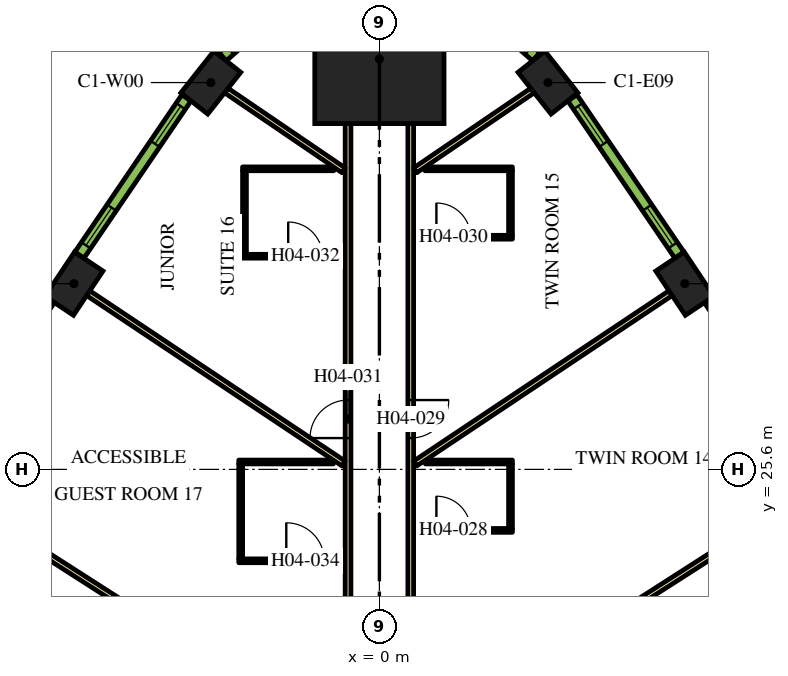
"""IFC4 building model, lengths in metres.
Left out: names, types, materials, properties, quantities, classifications, styles, units other than length and angle.
Written with IfcOpenShell. Run it as: python <this file> out.ifc"""

import sys

from ifc_helpers import new_model, si_unit, direction, frame, frame_2d, origin, origin_2d, place, context, subcontext, project, spatial, rectangle, extrude, element, fill, save


model = new_model("IFC4")
c1 = context("Model", 3, precision=1e-05, world=origin(), true_north=direction((0.0, 1.0)))
c2 = subcontext(c1, "Body", "Model", "MODEL_VIEW")
j1 = project(units=[si_unit("LENGTHUNIT", "METRE"), si_unit("PLANEANGLEUNIT", "RADIAN")], contexts=[c1])
p1 = place(None, origin())
s1 = spatial("IfcSite", under=j1, at=p1, CompositionType="ELEMENT")
p2 = place(p1, origin())
s2 = spatial("IfcBuilding", under=s1, at=p2, CompositionType="ELEMENT")
p3 = place(p2, frame((0.0, 0.0, 66.6)))
s3 = spatial("IfcBuildingStorey", under=s2, at=p3, CompositionType="ELEMENT", Elevation=66.6)
p4 = place(p3, frame((0.0, 36.399, 0.0), z_axis=(0.0, 0.0, 1.0), x_axis=(0.0, 1.0, 0.0)))
e1 = element("IfcColumn", 1, at=p4, inside=s3, PredefinedType="COLUMN", context=c2, shape_type="SweptSolid", body=[
    extrude(rectangle(XDim=3.4, YDim=3.4, at=origin_2d()), origin(), (0.0, 0.0, 1.0), 3.9),
])
for number, where, z_axis, x_axis in (
    (2, (8.037, 30.487, 0.0), (0.0, 0.0, 1.0), (-0.555, 0.832, 0.0)),
    (3, (4.436, 35.778, 0.0), (0.0, 0.0, 1.0), (-0.62, 0.784, 0.0)),
    (4, (-4.436, 35.778, 0.0), (0.0, 0.0, 1.0), (-0.62, -0.784, 0.0)),
    (5, (-8.037, 30.487, 0.0), (0.0, 0.0, 1.0), (-0.555, -0.832, 0.0)),
):
    element("IfcColumn", number, at=place(p3, frame(where, z_axis=z_axis, x_axis=x_axis)), inside=s3, PredefinedType="COLUMN", context=c2, shape_type="SweptSolid", body=[
        extrude(rectangle(XDim=1.4, YDim=0.9, at=origin_2d()), origin(), (0.0, 0.0, 1.0), 3.9),
    ])
p5 = place(p3, frame((0.825, 34.699, 0.0), z_axis=(0.0, 0.0, 1.0), x_axis=(0.0, -1.0, 0.0)))
e6 = element("IfcWall", 6, at=p5, inside=s3, PredefinedType="PARTITIONING", context=c2, shape_type="SweptSolid", body=[
    extrude(rectangle(XDim=16.144, YDim=0.15, at=frame_2d((8.072, 0.0))), origin(), (0.0, 0.0, 1.0), 2.75),
])
p6 = place(p5, frame((14.714, 0.0, 0.0)))
e7 = element("IfcOpeningElement", 7, at=p6, cuts=e6, PredefinedType="OPENING", context=c2, shape_type="SweptSolid", body=[
    extrude(rectangle(XDim=1.0, YDim=2.1, at=frame_2d((0.5, 1.05))), frame((0.0, 0.085, 0.0), z_axis=(0.0, -1.0, 0.0), x_axis=(1.0, 0.0, 0.0)), (0.0, 0.0, 1.0), 0.17),
])
p7 = place(p5, frame((7.275, 0.0, 0.0)))
e8 = element("IfcOpeningElement", 8, at=p7, cuts=e6, PredefinedType="OPENING", context=c2, shape_type="SweptSolid", body=[
    extrude(rectangle(XDim=1.0, YDim=2.1, at=frame_2d((0.5, 1.05))), frame((0.0, 0.085, 0.0), z_axis=(0.0, -1.0, 0.0), x_axis=(1.0, 0.0, 0.0)), (0.0, 0.0, 1.0), 0.17),
])
p8 = place(p3, frame((-0.825, 18.475, 0.0), z_axis=(0.0, 0.0, 1.0), x_axis=(0.0, 1.0, 0.0)))
e9 = element("IfcWall", 9, at=p8, inside=s3, PredefinedType="PARTITIONING", context=c2, shape_type="SweptSolid", body=[
    extrude(rectangle(XDim=16.224, YDim=0.15, at=frame_2d((8.112, 0.0))), origin(), (0.0, 0.0, 1.0), 2.75),
])
p9 = place(p8, frame((7.949, 0.0, 0.0)))
e10 = element("IfcOpeningElement", 10, at=p9, cuts=e9, PredefinedType="OPENING", context=c2, shape_type="SweptSolid", body=[
    extrude(rectangle(XDim=1.0, YDim=2.1, at=frame_2d((0.5, 1.05))), frame((0.0, 0.085, 0.0), z_axis=(0.0, -1.0, 0.0), x_axis=(1.0, 0.0, 0.0)), (0.0, 0.0, 1.0), 0.17),
])
p10 = place(p8, frame((0.526, 0.0, 0.0)))
e11 = element("IfcOpeningElement", 11, at=p10, cuts=e9, PredefinedType="OPENING", context=c2, shape_type="SweptSolid", body=[
    extrude(rectangle(XDim=1.1, YDim=2.1, at=frame_2d((0.55, 1.05))), frame((0.0, 0.085, 0.0), z_axis=(0.0, -1.0, 0.0), x_axis=(1.0, 0.0, 0.0)), (0.0, 0.0, 1.0), 0.17),
])
p11 = place(p3, frame((-11.16, 24.888, 0.0), z_axis=(0.0, 0.0, 1.0), x_axis=(0.84199813156, -0.539480441211, 0.0)))
e12 = element("IfcWall", 12, at=p11, inside=s3, PredefinedType="PARTITIONING", context=c2, shape_type="SweptSolid", body=[
    extrude(rectangle(XDim=11.638, YDim=0.15, at=frame_2d((5.819, 0.0))), origin(), (0.0, 0.0, 1.0), 2.75),
])
p12 = place(p3, frame((-7.662, 30.238, 0.0), z_axis=(0.0, 0.0, 1.0), x_axis=(0.831882886825, -0.554951225431, 0.0)))
e13 = element("IfcWall", 13, at=p12, inside=s3, PredefinedType="PARTITIONING", context=c2, shape_type="SweptSolid", body=[
    extrude(rectangle(XDim=8.079, YDim=0.15, at=frame_2d((4.04, 0.0))), origin(), (0.0, 0.0, 1.0), 2.75),
])
p13 = place(p3, frame((-4.028, 35.569, 0.0), z_axis=(0.0, 0.0, 1.0), x_axis=(0.826730622998, -0.562597971021, 0.0)))
e14 = element("IfcWall", 14, at=p13, inside=s3, PredefinedType="PARTITIONING", context=c2, shape_type="SweptSolid", body=[
    extrude(rectangle(XDim=3.733, YDim=0.15, at=frame_2d((1.867, 0.0))), origin(), (0.0, 0.0, 1.0), 2.75),
])
p14 = place(p3, frame((7.662, 30.238, 0.0), z_axis=(0.0, 0.0, 1.0), x_axis=(-0.831882886825, -0.554951225431, 0.0)))
e15 = element("IfcWall", 15, at=p14, inside=s3, PredefinedType="PARTITIONING", context=c2, shape_type="SweptSolid", body=[
    extrude(rectangle(XDim=8.079, YDim=0.15, at=frame_2d((4.04, 0.0))), origin(), (0.0, 0.0, 1.0), 2.75),
])
p15 = place(p3, frame((11.16, 24.888, 0.0), z_axis=(0.0, 0.0, 1.0), x_axis=(-0.84199813156, -0.539480441211, 0.0)))
e16 = element("IfcWall", 16, at=p15, inside=s3, PredefinedType="PARTITIONING", context=c2, shape_type="SweptSolid", body=[
    extrude(rectangle(XDim=11.638, YDim=0.15, at=frame_2d((5.819, 0.0))), origin(), (0.0, 0.0, 1.0), 2.75),
])
p16 = place(p3, frame((4.028, 35.569, 0.0), z_axis=(0.0, 0.0, 1.0), x_axis=(-0.826730622998, -0.562597971021, 0.0)))
e17 = element("IfcWall", 17, at=p16, inside=s3, PredefinedType="PARTITIONING", context=c2, shape_type="SweptSolid", body=[
    extrude(rectangle(XDim=3.733, YDim=0.15, at=frame_2d((1.867, 0.0))), origin(), (0.0, 0.0, 1.0), 2.75),
])
p17 = place(p3, frame((0.9, 23.994, 0.0), z_axis=(0.0, 0.0, 1.0), x_axis=(1.0, 0.0, 0.0)))
e18 = element("IfcWall", 18, at=p17, inside=s3, PredefinedType="PARTITIONING", context=c2, shape_type="SweptSolid", body=[
    extrude(rectangle(XDim=2.6, YDim=0.1, at=frame_2d((1.3, 0.0))), origin(), (0.0, 0.0, 1.0), 2.75),
])
p18 = place(p17, frame((0.6, 0.0, 0.0)))
e19 = element("IfcOpeningElement", 19, at=p18, cuts=e18, PredefinedType="OPENING", context=c2, shape_type="SweptSolid", body=[
    extrude(rectangle(XDim=0.9, YDim=2.1, at=frame_2d((0.45, 1.05))), frame((0.0, 0.06, 0.0), z_axis=(0.0, -1.0, 0.0), x_axis=(1.0, 0.0, 0.0)), (0.0, 0.0, 1.0), 0.12),
])
p19 = place(p3, frame((3.45, 24.044, 0.0), z_axis=(0.0, 0.0, 1.0), x_axis=(0.0, 1.0, 0.0)))
e20 = element("IfcWall", 20, at=p19, inside=s3, PredefinedType="PARTITIONING", context=c2, shape_type="SweptSolid", body=[
    extrude(rectangle(XDim=1.7, YDim=0.1, at=frame_2d((0.85, 0.0))), origin(), (0.0, 0.0, 1.0), 2.75),
])
p20 = place(p3, frame((1.21, 25.794, 0.0), z_axis=(0.0, 0.0, 1.0), x_axis=(1.0, 0.0, 0.0)))
e21 = element("IfcWall", 21, at=p20, inside=s3, PredefinedType="PARTITIONING", context=c2, shape_type="SweptSolid", body=[
    extrude(rectangle(XDim=2.29, YDim=0.1, at=frame_2d((1.145, 0.0))), origin(), (0.0, 0.0, 1.0), 2.75),
])
p21 = place(p3, frame((0.9, 31.708, 0.0), z_axis=(0.0, 0.0, 1.0), x_axis=(1.0, 0.0, 0.0)))
e22 = element("IfcWall", 22, at=p21, inside=s3, PredefinedType="PARTITIONING", context=c2, shape_type="SweptSolid", body=[
    extrude(rectangle(XDim=2.6, YDim=0.1, at=frame_2d((1.3, 0.0))), origin(), (0.0, 0.0, 1.0), 2.75),
])
p22 = place(p21, frame((0.6, 0.0, 0.0)))
e23 = element("IfcOpeningElement", 23, at=p22, cuts=e22, PredefinedType="OPENING", context=c2, shape_type="SweptSolid", body=[
    extrude(rectangle(XDim=0.9, YDim=2.1, at=frame_2d((0.45, 1.05))), frame((0.0, 0.06, 0.0), z_axis=(0.0, -1.0, 0.0), x_axis=(1.0, 0.0, 0.0)), (0.0, 0.0, 1.0), 0.12),
])
p23 = place(p3, frame((3.45, 31.759, 0.0), z_axis=(0.0, 0.0, 1.0), x_axis=(0.0, 1.0, 0.0)))
e24 = element("IfcWall", 24, at=p23, inside=s3, PredefinedType="PARTITIONING", context=c2, shape_type="SweptSolid", body=[
    extrude(rectangle(XDim=1.7, YDim=0.1, at=frame_2d((0.85, 0.0))), origin(), (0.0, 0.0, 1.0), 2.75),
])
p24 = place(p3, frame((1.2, 33.509, 0.0), z_axis=(0.0, 0.0, 1.0), x_axis=(1.0, 0.0, 0.0)))
e25 = element("IfcWall", 25, at=p24, inside=s3, PredefinedType="PARTITIONING", context=c2, shape_type="SweptSolid", body=[
    extrude(rectangle(XDim=2.3, YDim=0.1, at=frame_2d((1.15, 0.0))), origin(), (0.0, 0.0, 1.0), 2.75),
])
p25 = place(p3, frame((-3.6, 31.208, 0.0), z_axis=(0.0, 0.0, 1.0), x_axis=(1.0, 0.0, 0.0)))
e26 = element("IfcWall", 26, at=p25, inside=s3, PredefinedType="PARTITIONING", context=c2, shape_type="SweptSolid", body=[
    extrude(rectangle(XDim=2.7, YDim=0.1, at=frame_2d((1.35, 0.0))), origin(), (0.0, 0.0, 1.0), 2.75),
])
p26 = place(p25, frame((1.2, 0.0, 0.0)))
e27 = element("IfcOpeningElement", 27, at=p26, cuts=e26, PredefinedType="OPENING", context=c2, shape_type="SweptSolid", body=[
    extrude(rectangle(XDim=0.9, YDim=2.1, at=frame_2d((0.45, 1.05))), frame((0.0, 0.06, 0.0), z_axis=(0.0, -1.0, 0.0), x_axis=(1.0, 0.0, 0.0)), (0.0, 0.0, 1.0), 0.12),
])
p27 = place(p3, frame((-3.55, 31.259, 0.0), z_axis=(0.0, 0.0, 1.0), x_axis=(0.0, 1.0, 0.0)))
e28 = element("IfcWall", 28, at=p27, inside=s3, PredefinedType="PARTITIONING", context=c2, shape_type="SweptSolid", body=[
    extrude(rectangle(XDim=2.2, YDim=0.1, at=frame_2d((1.1, 0.0))), origin(), (0.0, 0.0, 1.0), 2.75),
])
p28 = place(p3, frame((-1.2, 33.509, 0.0), z_axis=(0.0, 0.0, 1.0), x_axis=(-1.0, 0.0, 0.0)))
e29 = element("IfcWall", 29, at=p28, inside=s3, PredefinedType="PARTITIONING", context=c2, shape_type="SweptSolid", body=[
    extrude(rectangle(XDim=2.4, YDim=0.1, at=frame_2d((1.2, 0.0))), origin(), (0.0, 0.0, 1.0), 2.75),
])
p29 = place(p3, frame((-3.7, 23.195, 0.0), z_axis=(0.0, 0.0, 1.0), x_axis=(1.0, 0.0, 0.0)))
e30 = element("IfcWall", 30, at=p29, inside=s3, PredefinedType="PARTITIONING", context=c2, shape_type="SweptSolid", body=[
    extrude(rectangle(XDim=2.8, YDim=0.1, at=frame_2d((1.4, 0.0))), origin(), (0.0, 0.0, 1.0), 2.75),
])
p30 = place(p29, frame((1.25, 0.0, 0.0)))
e31 = element("IfcOpeningElement", 31, at=p30, cuts=e30, PredefinedType="OPENING", context=c2, shape_type="SweptSolid", body=[
    extrude(rectangle(XDim=1.0, YDim=2.1, at=frame_2d((0.5, 1.05))), frame((0.0, 0.06, 0.0), z_axis=(0.0, -1.0, 0.0), x_axis=(1.0, 0.0, 0.0)), (0.0, 0.0, 1.0), 0.12),
])
p31 = place(p3, frame((-3.65, 23.245, 0.0), z_axis=(0.0, 0.0, 1.0), x_axis=(0.0, 1.0, 0.0)))
e32 = element("IfcWall", 32, at=p31, inside=s3, PredefinedType="PARTITIONING", context=c2, shape_type="SweptSolid", body=[
    extrude(rectangle(XDim=2.5, YDim=0.1, at=frame_2d((1.25, 0.0))), origin(), (0.0, 0.0, 1.0), 2.75),
])
p32 = place(p3, frame((-1.21, 25.795, 0.0), z_axis=(0.0, 0.0, 1.0), x_axis=(-1.0, 0.0, 0.0)))
e33 = element("IfcWall", 33, at=p32, inside=s3, PredefinedType="PARTITIONING", context=c2, shape_type="SweptSolid", body=[
    extrude(rectangle(XDim=2.49, YDim=0.1, at=frame_2d((1.245, 0.0))), origin(), (0.0, 0.0, 1.0), 2.75),
])
p33 = place(p3, frame((11.411, 25.884, 0.0), z_axis=(0.0, 0.0, 1.0), x_axis=(-0.547204617628, 0.836998868845, 0.0)))
e34 = element("IfcWall", 34, at=p33, inside=s3, PredefinedType="SOLIDWALL", context=c2, shape_type="SweptSolid", body=[
    extrude(rectangle(XDim=4.998, YDim=0.29, at=frame_2d((2.499, 0.0))), origin(), (0.0, 0.0, 1.0), 3.65),
])
p34 = place(p33, frame((0.297, 0.0, 0.9)))
e35 = element("IfcOpeningElement", 35, at=p34, cuts=e34, PredefinedType="OPENING", context=c2, shape_type="SweptSolid", body=[
    extrude(rectangle(XDim=1.2, YDim=2.15, at=frame_2d((0.6, 1.075))), frame((0.0, 0.155, 0.0), z_axis=(0.0, -1.0, 0.0), x_axis=(1.0, 0.0, 0.0)), (0.0, 0.0, 1.0), 0.31),
])
p35 = place(p33, frame((3.501, 0.0, 0.9)))
e36 = element("IfcOpeningElement", 36, at=p35, cuts=e34, PredefinedType="OPENING", context=c2, shape_type="SweptSolid", body=[
    extrude(rectangle(XDim=1.2, YDim=2.15, at=frame_2d((0.6, 1.075))), frame((0.0, 0.155, 0.0), z_axis=(0.0, -1.0, 0.0), x_axis=(1.0, 0.0, 0.0)), (0.0, 0.0, 1.0), 0.31),
])
p36 = place(p3, frame((7.895, 31.238, 0.0), z_axis=(0.0, 0.0, 1.0), x_axis=(-0.562610153679, 0.826722332454, 0.0)))
e37 = element("IfcWall", 37, at=p36, inside=s3, PredefinedType="SOLIDWALL", context=c2, shape_type="SweptSolid", body=[
    extrude(rectangle(XDim=5.006, YDim=0.29, at=frame_2d((2.503, 0.0))), origin(), (0.0, 0.0, 1.0), 3.65),
])
p37 = place(p36, frame((0.31, 0.0, 0.9)))
e38 = element("IfcOpeningElement", 38, at=p37, cuts=e37, PredefinedType="OPENING", context=c2, shape_type="SweptSolid", body=[
    extrude(rectangle(XDim=1.2, YDim=2.15, at=frame_2d((0.6, 1.075))), frame((0.0, 0.155, 0.0), z_axis=(0.0, -1.0, 0.0), x_axis=(1.0, 0.0, 0.0)), (0.0, 0.0, 1.0), 0.31),
])
p38 = place(p36, frame((3.541, 0.0, 0.9)))
e39 = element("IfcOpeningElement", 39, at=p38, cuts=e37, PredefinedType="OPENING", context=c2, shape_type="SweptSolid", body=[
    extrude(rectangle(XDim=1.2, YDim=2.15, at=frame_2d((0.6, 1.075))), frame((0.0, 0.155, 0.0), z_axis=(0.0, -1.0, 0.0), x_axis=(1.0, 0.0, 0.0)), (0.0, 0.0, 1.0), 0.31),
])
p39 = place(p3, frame((4.125, 36.459, 0.0), z_axis=(0.0, 0.0, 1.0), x_axis=(-0.749812680302, 0.661650167731, 0.0)))
e40 = element("IfcWall", 40, at=p39, inside=s3, PredefinedType="SOLIDWALL", context=c2, shape_type="SweptSolid", body=[
    extrude(rectangle(XDim=1.415, YDim=0.29, at=frame_2d((0.708, 0.0))), origin(), (0.0, 0.0, 1.0), 3.65),
])
p40 = place(p39, frame((0.258, 0.0, 0.9)))
e41 = element("IfcOpeningElement", 41, at=p40, cuts=e40, PredefinedType="OPENING", context=c2, shape_type="SweptSolid", body=[
    extrude(rectangle(XDim=0.9, YDim=2.15, at=frame_2d((0.45, 1.075))), frame((0.0, 0.155, 0.0), z_axis=(0.0, -1.0, 0.0), x_axis=(1.0, 0.0, 0.0)), (0.0, 0.0, 1.0), 0.31),
])
p41 = place(p3, frame((-3.064, 37.395, 0.0), z_axis=(0.0, 0.0, 1.0), x_axis=(-0.749812680302, -0.661650167731, 0.0)))
e42 = element("IfcWall", 42, at=p41, inside=s3, PredefinedType="SOLIDWALL", context=c2, shape_type="SweptSolid", body=[
    extrude(rectangle(XDim=1.415, YDim=0.29, at=frame_2d((0.708, 0.0))), origin(), (0.0, 0.0, 1.0), 3.65),
])
p42 = place(p41, frame((0.258, 0.0, 0.9)))
e43 = element("IfcOpeningElement", 43, at=p42, cuts=e42, PredefinedType="OPENING", context=c2, shape_type="SweptSolid", body=[
    extrude(rectangle(XDim=0.9, YDim=2.15, at=frame_2d((0.45, 1.075))), frame((0.0, 0.155, 0.0), z_axis=(0.0, -1.0, 0.0), x_axis=(1.0, 0.0, 0.0)), (0.0, 0.0, 1.0), 0.31),
])
p43 = place(p3, frame((-5.078, 35.376, 0.0), z_axis=(0.0, 0.0, 1.0), x_axis=(-0.562610153679, -0.826722332454, 0.0)))
e44 = element("IfcWall", 44, at=p43, inside=s3, PredefinedType="SOLIDWALL", context=c2, shape_type="SweptSolid", body=[
    extrude(rectangle(XDim=5.006, YDim=0.29, at=frame_2d((2.503, 0.0))), origin(), (0.0, 0.0, 1.0), 3.65),
])
p44 = place(p43, frame((0.265, 0.0, 0.9)))
e45 = element("IfcOpeningElement", 45, at=p44, cuts=e44, PredefinedType="OPENING", context=c2, shape_type="SweptSolid", body=[
    extrude(rectangle(XDim=1.2, YDim=2.15, at=frame_2d((0.6, 1.075))), frame((0.0, 0.155, 0.0), z_axis=(0.0, -1.0, 0.0), x_axis=(1.0, 0.0, 0.0)), (0.0, 0.0, 1.0), 0.31),
])
p45 = place(p43, frame((3.495, 0.0, 0.9)))
e46 = element("IfcOpeningElement", 46, at=p45, cuts=e44, PredefinedType="OPENING", context=c2, shape_type="SweptSolid", body=[
    extrude(rectangle(XDim=1.2, YDim=2.15, at=frame_2d((0.6, 1.075))), frame((0.0, 0.155, 0.0), z_axis=(0.0, -1.0, 0.0), x_axis=(1.0, 0.0, 0.0)), (0.0, 0.0, 1.0), 0.31),
])
p46 = place(p3, frame((-8.676, 30.068, 0.0), z_axis=(0.0, 0.0, 1.0), x_axis=(-0.547204617628, -0.836998868845, 0.0)))
e47 = element("IfcWall", 47, at=p46, inside=s3, PredefinedType="SOLIDWALL", context=c2, shape_type="SweptSolid", body=[
    extrude(rectangle(XDim=4.998, YDim=0.29, at=frame_2d((2.499, 0.0))), origin(), (0.0, 0.0, 1.0), 3.65),
])
p47 = place(p46, frame((0.297, 0.0, 0.9)))
e48 = element("IfcOpeningElement", 48, at=p47, cuts=e47, PredefinedType="OPENING", context=c2, shape_type="SweptSolid", body=[
    extrude(rectangle(XDim=1.2, YDim=2.15, at=frame_2d((0.6, 1.075))), frame((0.0, 0.155, 0.0), z_axis=(0.0, -1.0, 0.0), x_axis=(1.0, 0.0, 0.0)), (0.0, 0.0, 1.0), 0.31),
])
p48 = place(p46, frame((3.501, 0.0, 0.9)))
e49 = element("IfcOpeningElement", 49, at=p48, cuts=e47, PredefinedType="OPENING", context=c2, shape_type="SweptSolid", body=[
    extrude(rectangle(XDim=1.2, YDim=2.15, at=frame_2d((0.6, 1.075))), frame((0.0, 0.155, 0.0), z_axis=(0.0, -1.0, 0.0), x_axis=(1.0, 0.0, 0.0)), (0.0, 0.0, 1.0), 0.31),
])
p49 = place(p18, origin())
e50 = element("IfcDoor", 50, at=p49, inside=s3, OperationType="SINGLE_SWING_LEFT", PredefinedType="DOOR", context=c2, shape_type="SweptSolid", body=[
    extrude(rectangle(XDim=0.9, YDim=2.1, at=frame_2d((0.45, 1.05))), frame((0.0, 0.025, 0.0), z_axis=(0.0, -1.0, 0.0), x_axis=(1.0, 0.0, 0.0)), (0.0, 0.0, 1.0), 0.05),
])
fill(e19, e50)
p50 = place(p7, origin())
e51 = element("IfcDoor", 51, at=p50, inside=s3, OperationType="SINGLE_SWING_RIGHT", PredefinedType="DOOR", context=c2, shape_type="SweptSolid", body=[
    extrude(rectangle(XDim=1.0, YDim=2.1, at=frame_2d((0.5, 1.05))), frame((0.0, 0.025, 0.0), z_axis=(0.0, -1.0, 0.0), x_axis=(1.0, 0.0, 0.0)), (0.0, 0.0, 1.0), 0.05),
])
fill(e8, e51)
p51 = place(p22, origin())
e52 = element("IfcDoor", 52, at=p51, inside=s3, OperationType="SINGLE_SWING_RIGHT", PredefinedType="DOOR", context=c2, shape_type="SweptSolid", body=[
    extrude(rectangle(XDim=0.9, YDim=2.1, at=frame_2d((0.45, 1.05))), frame((0.0, 0.025, 0.0), z_axis=(0.0, -1.0, 0.0), x_axis=(1.0, 0.0, 0.0)), (0.0, 0.0, 1.0), 0.05),
])
fill(e23, e52)
p52 = place(p9, origin())
e53 = element("IfcDoor", 53, at=p52, inside=s3, OperationType="SINGLE_SWING_LEFT", PredefinedType="DOOR", context=c2, shape_type="SweptSolid", body=[
    extrude(rectangle(XDim=1.0, YDim=2.1, at=frame_2d((0.5, 1.05))), frame((0.0, 0.025, 0.0), z_axis=(0.0, -1.0, 0.0), x_axis=(1.0, 0.0, 0.0)), (0.0, 0.0, 1.0), 0.05),
])
fill(e10, e53)
p53 = place(p26, origin())
e54 = element("IfcDoor", 54, at=p53, inside=s3, OperationType="SINGLE_SWING_LEFT", PredefinedType="DOOR", context=c2, shape_type="SweptSolid", body=[
    extrude(rectangle(XDim=0.9, YDim=2.1, at=frame_2d((0.45, 1.05))), frame((0.0, 0.025, 0.0), z_axis=(0.0, -1.0, 0.0), x_axis=(1.0, 0.0, 0.0)), (0.0, 0.0, 1.0), 0.05),
])
fill(e27, e54)
p54 = place(p30, origin())
e55 = element("IfcDoor", 55, at=p54, inside=s3, OperationType="SINGLE_SWING_LEFT", PredefinedType="DOOR", context=c2, shape_type="SweptSolid", body=[
    extrude(rectangle(XDim=1.0, YDim=2.1, at=frame_2d((0.5, 1.05))), frame((0.0, 0.025, 0.0), z_axis=(0.0, -1.0, 0.0), x_axis=(1.0, 0.0, 0.0)), (0.0, 0.0, 1.0), 0.05),
])
fill(e31, e55)
p55 = place(p37, origin())
e56 = element("IfcWindow", 56, at=p55, inside=s3, PartitioningType="DOUBLE_PANEL_VERTICAL", PredefinedType="WINDOW", context=c2, shape_type="SweptSolid", body=[
    extrude(rectangle(XDim=1.2, YDim=2.15, at=frame_2d((0.6, 1.075))), frame((0.0, 0.015, 0.0), z_axis=(0.0, -1.0, 0.0), x_axis=(1.0, 0.0, 0.0)), (0.0, 0.0, 1.0), 0.06),
])
fill(e38, e56)
p56 = place(p38, origin())
e57 = element("IfcWindow", 57, at=p56, inside=s3, PartitioningType="DOUBLE_PANEL_VERTICAL", PredefinedType="WINDOW", context=c2, shape_type="SweptSolid", body=[
    extrude(rectangle(XDim=1.2, YDim=2.15, at=frame_2d((0.6, 1.075))), frame((0.0, 0.015, 0.0), z_axis=(0.0, -1.0, 0.0), x_axis=(1.0, 0.0, 0.0)), (0.0, 0.0, 1.0), 0.06),
])
fill(e39, e57)
p57 = place(p44, origin())
e58 = element("IfcWindow", 58, at=p57, inside=s3, PartitioningType="DOUBLE_PANEL_VERTICAL", PredefinedType="WINDOW", context=c2, shape_type="SweptSolid", body=[
    extrude(rectangle(XDim=1.2, YDim=2.15, at=frame_2d((0.6, 1.075))), frame((0.0, 0.015, 0.0), z_axis=(0.0, -1.0, 0.0), x_axis=(1.0, 0.0, 0.0)), (0.0, 0.0, 1.0), 0.06),
])
fill(e45, e58)
p58 = place(p45, origin())
e59 = element("IfcWindow", 59, at=p58, inside=s3, PartitioningType="DOUBLE_PANEL_VERTICAL", PredefinedType="WINDOW", context=c2, shape_type="SweptSolid", body=[
    extrude(rectangle(XDim=1.2, YDim=2.15, at=frame_2d((0.6, 1.075))), frame((0.0, 0.015, 0.0), z_axis=(0.0, -1.0, 0.0), x_axis=(1.0, 0.0, 0.0)), (0.0, 0.0, 1.0), 0.06),
])
fill(e46, e59)
save(model, sys.argv[1])
